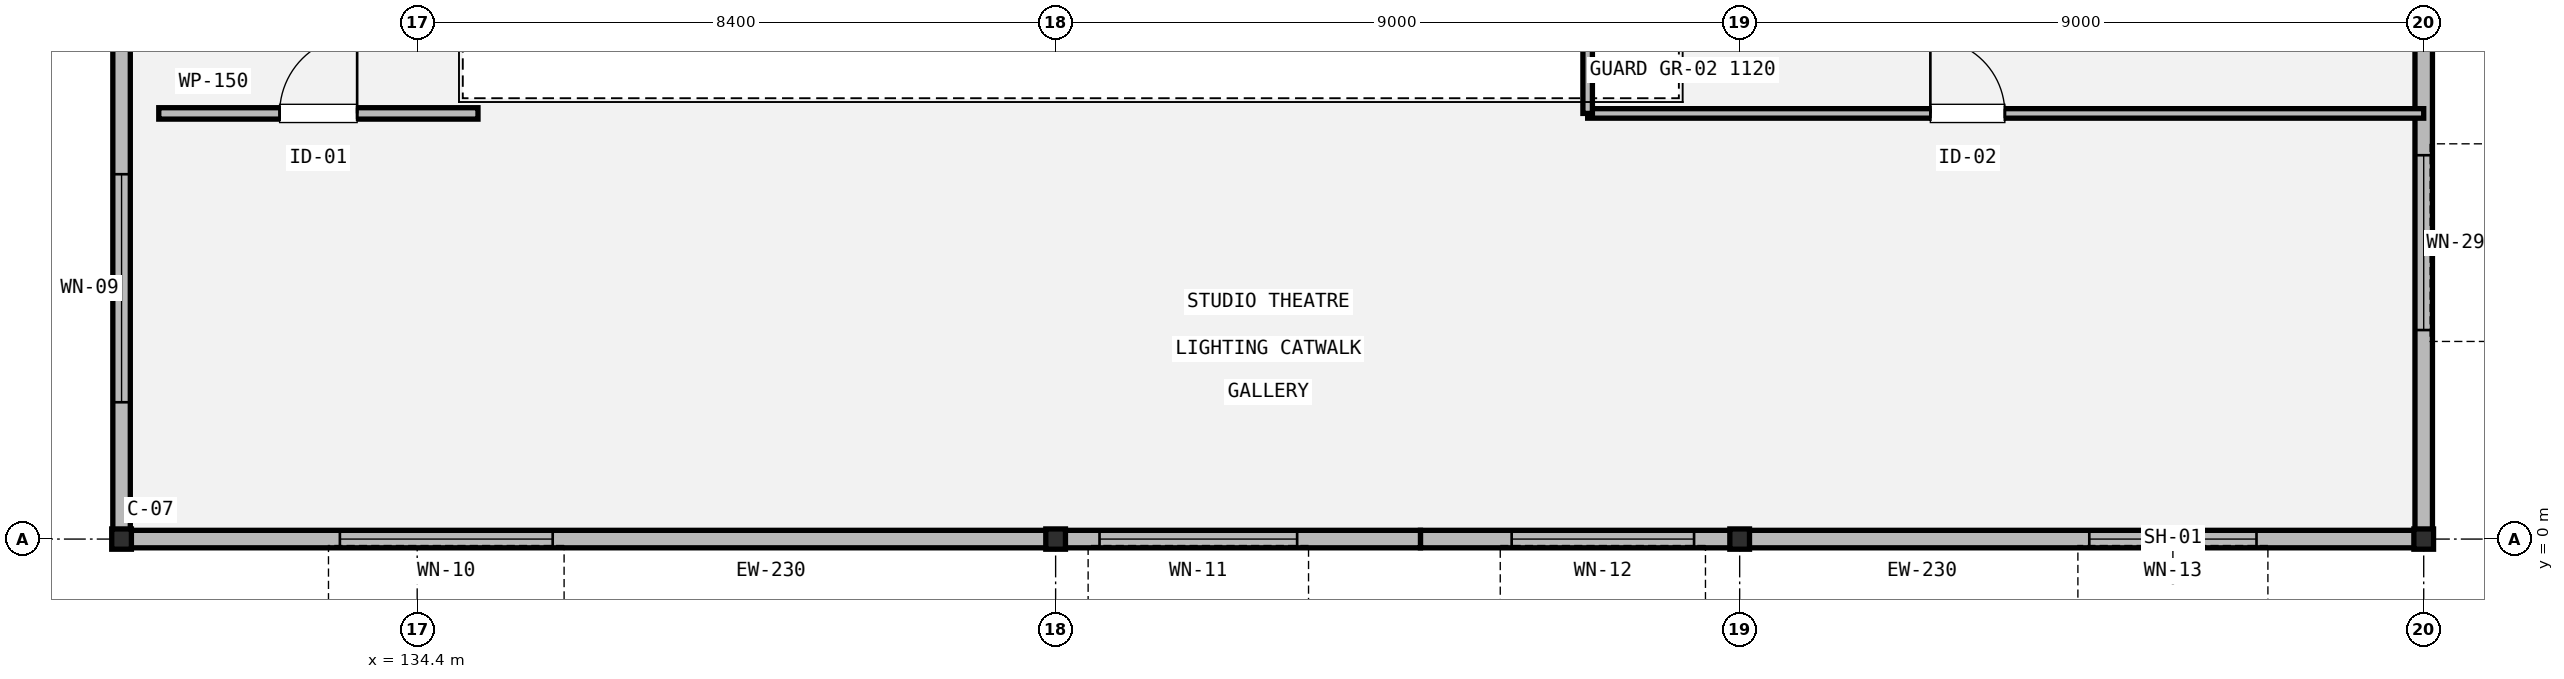
"""IFC4 building model, lengths in metres.
Left out: names, types, materials, properties, quantities, classifications, styles, units other than length and angle.
Written with IfcOpenShell. Run it as: python <this file> out.ifc"""

import sys

from ifc_helpers import new_model, si_unit, direction, frame, frame_2d, origin, origin_2d, place, context, subcontext, project, spatial, rectangle, i_section, extrude, element, fill, save


model = new_model("IFC4")
c1 = context("Model", 3, precision=1e-05, world=origin(), true_north=direction((0.0, 1.0)))
c2 = subcontext(c1, "Body", "Model", "MODEL_VIEW")
j1 = project(units=[si_unit("LENGTHUNIT", "METRE"), si_unit("PLANEANGLEUNIT", "RADIAN")], contexts=[c1])
p1 = place(None, origin())
s1 = spatial("IfcSite", under=j1, at=p1, CompositionType="ELEMENT")
p2 = place(p1, origin())
s2 = spatial("IfcBuilding", under=s1, at=p2, CompositionType="ELEMENT")
p3 = place(p2, frame((0.0, 0.0, 10.2)))
s3 = spatial("IfcBuildingStorey", under=s2, at=p3, CompositionType="ELEMENT", Elevation=10.2)
for number, where, z_axis, x_axis in (
    (1, (130.51, 0.0, 0.0), (0.0, 0.0, 1.0), (1.0, 0.0, 0.0)),
    (2, (142.8, 0.0, 0.0), (0.0, 0.0, 1.0), (1.0, 0.0, 0.0)),
    (3, (151.8, 0.0, 0.0), (0.0, 0.0, 1.0), (1.0, 0.0, 0.0)),
    (4, (160.8, 0.0, 0.0), (0.0, 0.0, 1.0), (1.0, 0.0, 0.0)),
):
    element("IfcColumn", number, at=place(p3, frame(where, z_axis=z_axis, x_axis=x_axis)), inside=s3, PredefinedType="COLUMN", context=c2, shape_type="SweptSolid", body=[
        extrude(i_section(OverallWidth=0.259, OverallDepth=0.267, WebThickness=0.013, FlangeThickness=0.021, FilletRadius=0.013, at=origin_2d()), origin(), (0.0, 0.0, 1.0), 4.8),
    ])
p4 = place(p3, frame((160.8, 0.0, 0.0), z_axis=(0.0, 0.0, 1.0), x_axis=(-1.0, 0.0, 0.0)))
e5 = element("IfcWall", 5, at=p4, inside=s3, PredefinedType="STANDARD", context=c2, shape_type="SweptSolid", body=[
    extrude(rectangle(XDim=13.2, YDim=0.23, at=frame_2d((6.6, 0.0))), origin(), (0.0, 0.0, 1.0), 3.802),
])
p5 = place(p4, frame((2.2, 0.0, 0.9)))
e6 = element("IfcOpeningElement", 6, at=p5, cuts=e5, PredefinedType="OPENING", context=c2, shape_type="SweptSolid", body=[
    extrude(rectangle(XDim=2.2, YDim=1.15, at=frame_2d((1.1, 0.575))), frame((0.0, 0.125, 0.0), z_axis=(0.0, -1.0, 0.0), x_axis=(1.0, 0.0, 0.0)), (0.0, 0.0, 1.0), 0.25),
])
p6 = place(p4, frame((9.6, 0.0, 0.9)))
e7 = element("IfcOpeningElement", 7, at=p6, cuts=e5, PredefinedType="OPENING", context=c2, shape_type="SweptSolid", body=[
    extrude(rectangle(XDim=2.4, YDim=1.15, at=frame_2d((1.2, 0.575))), frame((0.0, 0.125, 0.0), z_axis=(0.0, -1.0, 0.0), x_axis=(1.0, 0.0, 0.0)), (0.0, 0.0, 1.0), 0.25),
])
p7 = place(p3, frame((147.6, 0.0, 0.0), z_axis=(0.0, 0.0, 1.0), x_axis=(-1.0, 0.0, 0.0)))
e8 = element("IfcWall", 8, at=p7, inside=s3, PredefinedType="STANDARD", context=c2, shape_type="SweptSolid", body=[
    extrude(rectangle(XDim=17.09, YDim=0.23, at=frame_2d((8.545, 0.0))), origin(), (0.0, 0.0, 1.0), 3.889),
])
p8 = place(p7, frame((1.622, 0.0, 0.9)))
e9 = element("IfcOpeningElement", 9, at=p8, cuts=e8, PredefinedType="OPENING", context=c2, shape_type="SweptSolid", body=[
    extrude(rectangle(XDim=2.6, YDim=1.2, at=frame_2d((1.3, 0.6))), frame((0.0, 0.125, 0.0), z_axis=(0.0, -1.0, 0.0), x_axis=(1.0, 0.0, 0.0)), (0.0, 0.0, 1.0), 0.25),
])
p9 = place(p7, frame((11.417, 0.0, 0.9)))
e10 = element("IfcOpeningElement", 10, at=p9, cuts=e8, PredefinedType="OPENING", context=c2, shape_type="SweptSolid", body=[
    extrude(rectangle(XDim=2.8, YDim=1.2, at=frame_2d((1.4, 0.6))), frame((0.0, 0.125, 0.0), z_axis=(0.0, -1.0, 0.0), x_axis=(1.0, 0.0, 0.0)), (0.0, 0.0, 1.0), 0.25),
])
p10 = place(p3, frame((130.51, 0.0, 0.0), z_axis=(0.0, 0.0, 1.0), x_axis=(0.0, 1.0, 0.0)))
e11 = element("IfcWall", 11, at=p10, inside=s3, PredefinedType="STANDARD", context=c2, shape_type="SweptSolid", body=[
    extrude(rectangle(XDim=18.6, YDim=0.23, at=frame_2d((9.3, 0.0))), origin(), (0.0, 0.0, 1.0), 4.552),
])
p11 = place(p10, frame((1.8, 0.0, 0.9)))
e12 = element("IfcOpeningElement", 12, at=p11, cuts=e11, PredefinedType="OPENING", context=c2, shape_type="SweptSolid", body=[
    extrude(rectangle(XDim=3.0, YDim=1.2, at=frame_2d((1.5, 0.6))), frame((0.0, 0.125, 0.0), z_axis=(0.0, -1.0, 0.0), x_axis=(1.0, 0.0, 0.0)), (0.0, 0.0, 1.0), 0.25),
])
p12 = place(p10, frame((13.475, 0.0, 0.9)))
e13 = element("IfcOpeningElement", 13, at=p12, cuts=e11, PredefinedType="OPENING", context=c2, shape_type="SweptSolid", body=[
    extrude(rectangle(XDim=0.95, YDim=1.5, at=frame_2d((0.475, 0.75))), frame((0.0, 0.125, 0.0), z_axis=(0.0, -1.0, 0.0), x_axis=(1.0, 0.0, 0.0)), (0.0, 0.0, 1.0), 0.25),
])
p13 = place(p3, frame((160.8, 15.6, 0.0), z_axis=(0.0, 0.0, 1.0), x_axis=(0.0, -1.0, 0.0)))
e14 = element("IfcWall", 14, at=p13, inside=s3, PredefinedType="STANDARD", context=c2, shape_type="SweptSolid", body=[
    extrude(rectangle(XDim=15.6, YDim=0.23, at=frame_2d((7.8, 0.0))), origin(), (0.0, 0.0, 1.0), 3.889),
])
p14 = place(p13, frame((2.85, 0.0, 0.9)))
e15 = element("IfcOpeningElement", 15, at=p14, cuts=e14, PredefinedType="OPENING", context=c2, shape_type="SweptSolid", body=[
    extrude(rectangle(XDim=2.1, YDim=1.95, at=frame_2d((1.05, 0.975))), frame((0.0, 0.125, 0.0), z_axis=(0.0, -1.0, 0.0), x_axis=(1.0, 0.0, 0.0)), (0.0, 0.0, 1.0), 0.25),
])
p15 = place(p13, frame((10.55, 0.0, 0.9)))
e16 = element("IfcOpeningElement", 16, at=p15, cuts=e14, PredefinedType="OPENING", context=c2, shape_type="SweptSolid", body=[
    extrude(rectangle(XDim=2.3, YDim=1.95, at=frame_2d((1.15, 0.975))), frame((0.0, 0.125, 0.0), z_axis=(0.0, -1.0, 0.0), x_axis=(1.0, 0.0, 0.0)), (0.0, 0.0, 1.0), 0.25),
])
p16 = place(p3, frame((131.0, 5.6, 0.0), z_axis=(0.0, 0.0, 1.0), x_axis=(1.0, 0.0, 0.0)))
e17 = element("IfcWall", 17, at=p16, inside=s3, PredefinedType="PARTITIONING", context=c2, shape_type="SweptSolid", body=[
    extrude(rectangle(XDim=4.2, YDim=0.15, at=frame_2d((2.1, 0.0))), origin(), (0.0, 0.0, 1.0), 4.552),
])
p17 = place(p16, frame((1.59, 0.0, 0.0)))
e18 = element("IfcOpeningElement", 18, at=p17, cuts=e17, PredefinedType="OPENING", context=c2, shape_type="SweptSolid", body=[
    extrude(rectangle(XDim=1.02, YDim=2.1, at=frame_2d((0.51, 1.05))), frame((0.0, 0.085, 0.0), z_axis=(0.0, -1.0, 0.0), x_axis=(1.0, 0.0, 0.0)), (0.0, 0.0, 1.0), 0.17),
])
p18 = place(p3, frame((149.8, 5.6, 0.0), z_axis=(0.0, 0.0, 1.0), x_axis=(1.0, 0.0, 0.0)))
e19 = element("IfcWall", 19, at=p18, inside=s3, PredefinedType="PARTITIONING", context=c2, shape_type="SweptSolid", body=[
    extrude(rectangle(XDim=11.0, YDim=0.125, at=frame_2d((5.5, 0.0))), origin(), (0.0, 0.0, 1.0), 3.802),
])
p19 = place(p18, frame((4.509, 0.0, 0.0)))
e20 = element("IfcOpeningElement", 20, at=p19, cuts=e19, PredefinedType="OPENING", context=c2, shape_type="SweptSolid", body=[
    extrude(rectangle(XDim=0.98, YDim=2.1, at=frame_2d((0.49, 1.05))), frame((0.0, 0.073, 0.0), z_axis=(0.0, -1.0, 0.0), x_axis=(1.0, 0.0, 0.0)), (0.0, 0.0, 1.0), 0.145),
])
p20 = place(p3, frame((149.8, 5.6, 0.0), z_axis=(0.0, 0.0, 1.0), x_axis=(0.0, 1.0, 0.0)))
e21 = element("IfcWall", 21, at=p20, inside=s3, PredefinedType="PARTITIONING", context=c2, shape_type="SweptSolid", body=[
    extrude(rectangle(XDim=10.0, YDim=0.125, at=frame_2d((5.0, 0.0))), origin(), (0.0, 0.0, 1.0), 4.552),
])
p21 = place(p5, origin())
e22 = element("IfcWindow", 22, at=p21, inside=s3, PartitioningType="SINGLE_PANEL", PredefinedType="WINDOW", context=c2, shape_type="SweptSolid", body=[
    extrude(rectangle(XDim=2.2, YDim=1.15, at=frame_2d((1.1, 0.575))), frame((0.0, 0.03, 0.0), z_axis=(0.0, -1.0, 0.0), x_axis=(1.0, 0.0, 0.0)), (0.0, 0.0, 1.0), 0.06),
])
fill(e6, e22)
p22 = place(p6, origin())
e23 = element("IfcWindow", 23, at=p22, inside=s3, PartitioningType="SINGLE_PANEL", PredefinedType="WINDOW", context=c2, shape_type="SweptSolid", body=[
    extrude(rectangle(XDim=2.4, YDim=1.15, at=frame_2d((1.2, 0.575))), frame((0.0, 0.03, 0.0), z_axis=(0.0, -1.0, 0.0), x_axis=(1.0, 0.0, 0.0)), (0.0, 0.0, 1.0), 0.06),
])
fill(e7, e23)
p23 = place(p8, origin())
e24 = element("IfcWindow", 24, at=p23, inside=s3, PartitioningType="SINGLE_PANEL", PredefinedType="WINDOW", context=c2, shape_type="SweptSolid", body=[
    extrude(rectangle(XDim=2.6, YDim=1.2, at=frame_2d((1.3, 0.6))), frame((0.0, 0.03, 0.0), z_axis=(0.0, -1.0, 0.0), x_axis=(1.0, 0.0, 0.0)), (0.0, 0.0, 1.0), 0.06),
])
fill(e9, e24)
p24 = place(p9, origin())
e25 = element("IfcWindow", 25, at=p24, inside=s3, PartitioningType="SINGLE_PANEL", PredefinedType="WINDOW", context=c2, shape_type="SweptSolid", body=[
    extrude(rectangle(XDim=2.8, YDim=1.2, at=frame_2d((1.4, 0.6))), frame((0.0, 0.03, 0.0), z_axis=(0.0, -1.0, 0.0), x_axis=(1.0, 0.0, 0.0)), (0.0, 0.0, 1.0), 0.06),
])
fill(e10, e25)
p25 = place(p11, origin())
e26 = element("IfcWindow", 26, at=p25, inside=s3, PartitioningType="SINGLE_PANEL", PredefinedType="WINDOW", context=c2, shape_type="SweptSolid", body=[
    extrude(rectangle(XDim=3.0, YDim=1.2, at=frame_2d((1.5, 0.6))), frame((0.0, 0.03, 0.0), z_axis=(0.0, -1.0, 0.0), x_axis=(1.0, 0.0, 0.0)), (0.0, 0.0, 1.0), 0.06),
])
fill(e12, e26)
p26 = place(p15, origin())
e27 = element("IfcWindow", 27, at=p26, inside=s3, PartitioningType="SINGLE_PANEL", PredefinedType="WINDOW", context=c2, shape_type="SweptSolid", body=[
    extrude(rectangle(XDim=2.3, YDim=1.95, at=frame_2d((1.15, 0.975))), frame((0.0, 0.03, 0.0), z_axis=(0.0, -1.0, 0.0), x_axis=(1.0, 0.0, 0.0)), (0.0, 0.0, 1.0), 0.06),
])
fill(e16, e27)
p27 = place(p17, origin())
e28 = element("IfcDoor", 28, at=p27, inside=s3, OperationType="SINGLE_SWING_RIGHT", PredefinedType="DOOR", context=c2, shape_type="SweptSolid", body=[
    extrude(rectangle(XDim=1.02, YDim=2.1, at=frame_2d((0.51, 1.05))), frame((0.0, 0.025, 0.0), z_axis=(0.0, -1.0, 0.0), x_axis=(1.0, 0.0, 0.0)), (0.0, 0.0, 1.0), 0.05),
])
fill(e18, e28)
p28 = place(p19, origin())
e29 = element("IfcDoor", 29, at=p28, inside=s3, OperationType="SINGLE_SWING_LEFT", PredefinedType="DOOR", context=c2, shape_type="SweptSolid", body=[
    extrude(rectangle(XDim=0.98, YDim=2.1, at=frame_2d((0.49, 1.05))), frame((0.0, 0.025, 0.0), z_axis=(0.0, -1.0, 0.0), x_axis=(1.0, 0.0, 0.0)), (0.0, 0.0, 1.0), 0.05),
])
fill(e20, e29)
save(model, sys.argv[1])
